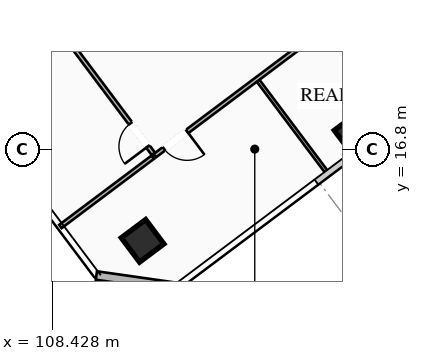
"""IFC4 building model, lengths in metres.
Left out: names, types, materials, properties, quantities, classifications, styles, units other than length and angle.
Written with IfcOpenShell. Run it as: python <this file> out.ifc"""

import sys

from ifc_helpers import new_model, si_unit, direction, frame, frame_2d, origin, origin_2d, place, context, subcontext, project, spatial, rectangle, hollow_rectangle, extrude, element, fill, save


model = new_model("IFC4")
c1 = context("Model", 3, precision=1e-05, world=origin(), true_north=direction((0.0, 1.0)))
c2 = subcontext(c1, "Body", "Model", "MODEL_VIEW")
j1 = project(units=[si_unit("LENGTHUNIT", "METRE"), si_unit("PLANEANGLEUNIT", "RADIAN")], contexts=[c1])
p1 = place(None, origin())
s1 = spatial("IfcSite", under=j1, at=p1, CompositionType="ELEMENT")
p2 = place(p1, origin())
s2 = spatial("IfcBuilding", under=s1, at=p2, CompositionType="ELEMENT")
p3 = place(p2, frame((0.0, 0.0, 239.7)))
s3 = spatial("IfcBuildingStorey", under=s2, at=p3, CompositionType="ELEMENT", Elevation=239.7)
p4 = place(p3, frame((111.4, 13.8, 0.0), z_axis=(0.0, 0.0, 1.0), x_axis=(0.799999996291, 0.600000004945, 0.0)))
e1 = element("IfcColumn", 1, at=p4, inside=s3, PredefinedType="COLUMN", context=c2, shape_type="SweptSolid", body=[
    extrude(hollow_rectangle(XDim=1.0, YDim=1.0, WallThickness=0.04, at=origin_2d()), origin(), (0.0, 0.0, 1.0), 3.37),
])
p5 = place(p3, frame((118.23, 17.36, 0.0), z_axis=(0.0, 0.0, 1.0), x_axis=(0.799999996291, 0.600000004945, 0.0)))
e2 = element("IfcColumn", 2, at=p5, inside=s3, PredefinedType="COLUMN", context=c2, shape_type="SweptSolid", body=[
    extrude(hollow_rectangle(XDim=0.75, YDim=0.75, WallThickness=0.032, at=origin_2d()), origin(), (0.0, 0.0, 1.0), 3.37),
])
p6 = place(p3, frame((112.54, 12.28, 0.0), z_axis=(0.0, 0.0, 1.0), x_axis=(-0.989956760759, 0.141370477216, 0.0)))
e3 = element("IfcWall", 3, at=p6, inside=s3, PredefinedType="SOLIDWALL", context=c2, shape_type="SweptSolid", body=[
    extrude(rectangle(XDim=2.687, YDim=0.28, at=frame_2d((1.344, 0.0))), origin(), (0.0, 0.0, 1.0), 3.37),
])
p7 = place(p3, frame((124.12, 25.84, 0.0), z_axis=(0.0, 0.0, 1.0), x_axis=(-0.800001902384, -0.599997463479, 0.0)))
e4 = element("IfcWall", 4, at=p7, inside=s3, PredefinedType="PARTITIONING", context=c2, shape_type="SweptSolid", body=[
    extrude(rectangle(XDim=15.4, YDim=0.135, at=frame_2d((7.7, 0.0))), origin(), (0.0, 0.0, 1.0), 2.723),
])
p8 = place(p7, frame((14.07, 0.0, 0.0)))
e5 = element("IfcOpeningElement", 5, at=p8, cuts=e4, PredefinedType="OPENING", context=c2, shape_type="SweptSolid", body=[
    extrude(rectangle(XDim=0.95, YDim=2.05, at=frame_2d((0.475, 1.025))), frame((0.0, 0.077, 0.0), z_axis=(0.0, -1.0, 0.0), x_axis=(1.0, 0.0, 0.0)), (0.0, 0.0, 1.0), 0.155),
])
p9 = place(p7, frame((3.64, 0.0, 0.0)))
e6 = element("IfcOpeningElement", 6, at=p9, cuts=e4, PredefinedType="OPENING", context=c2, shape_type="SweptSolid", body=[
    extrude(rectangle(XDim=0.95, YDim=2.05, at=frame_2d((0.475, 1.025))), frame((0.0, 0.077, 0.0), z_axis=(0.0, -1.0, 0.0), x_axis=(1.0, 0.0, 0.0)), (0.0, 0.0, 1.0), 0.155),
])
p10 = place(p7, frame((0.38, 0.0, 0.0)))
e7 = element("IfcOpeningElement", 7, at=p10, cuts=e4, PredefinedType="OPENING", context=c2, shape_type="SweptSolid", body=[
    extrude(rectangle(XDim=0.95, YDim=2.05, at=frame_2d((0.475, 1.025))), frame((0.0, 0.077, 0.0), z_axis=(0.0, -1.0, 0.0), x_axis=(1.0, 0.0, 0.0)), (0.0, 0.0, 1.0), 0.155),
])
p11 = place(p3, frame((117.488, 16.016, 0.0), z_axis=(0.0, 0.0, 1.0), x_axis=(-0.600030839559, 0.799976869402, 0.0)))
e8 = element("IfcWall", 8, at=p11, inside=s3, PredefinedType="PARTITIONING", context=c2, shape_type="SweptSolid", body=[
    extrude(rectangle(XDim=3.8, YDim=0.11, at=frame_2d((1.9, 0.0))), origin(), (0.0, 0.0, 1.0), 2.723),
])
p12 = place(p3, frame((111.752, 16.664, 0.0), z_axis=(0.0, 0.0, 1.0), x_axis=(-0.599998165212, 0.800001376088, 0.0)))
e9 = element("IfcWall", 9, at=p12, inside=s3, PredefinedType="PARTITIONING", context=c2, shape_type="SweptSolid", body=[
    extrude(rectangle(XDim=21.29, YDim=0.135, at=frame_2d((10.645, 0.0))), origin(), (0.0, 0.0, 1.0), 2.723),
])
p13 = place(p12, frame((0.3, 0.0, 0.0)))
e10 = element("IfcOpeningElement", 10, at=p13, cuts=e9, PredefinedType="OPENING", context=c2, shape_type="SweptSolid", body=[
    extrude(rectangle(XDim=0.95, YDim=2.05, at=frame_2d((0.475, 1.025))), frame((0.0, 0.077, 0.0), z_axis=(0.0, -1.0, 0.0), x_axis=(1.0, 0.0, 0.0)), (0.0, 0.0, 1.0), 0.155),
])
p14 = place(p3, frame((108.696, 14.272, 0.0), z_axis=(0.0, 0.0, 1.0), x_axis=(0.8, 0.6, 0.0)))
e11 = element("IfcWall", 11, at=p14, inside=s3, PredefinedType="PARTITIONING", context=c2, shape_type="SweptSolid", body=[
    extrude(rectangle(XDim=3.8, YDim=0.135, at=frame_2d((1.9, 0.0))), origin(), (0.0, 0.0, 1.0), 2.723),
])
p15 = place(p8, origin())
e12 = element("IfcDoor", 12, at=p15, inside=s3, OperationType="SINGLE_SWING_LEFT", PredefinedType="DOOR", context=c2, shape_type="SweptSolid", body=[
    extrude(rectangle(XDim=0.95, YDim=2.05, at=frame_2d((0.475, 1.025))), frame((0.0, 0.025, 0.0), z_axis=(0.0, -1.0, 0.0), x_axis=(1.0, 0.0, 0.0)), (0.0, 0.0, 1.0), 0.05),
])
fill(e5, e12)
p16 = place(p13, origin())
e13 = element("IfcDoor", 13, at=p16, inside=s3, OperationType="SINGLE_SWING_LEFT", PredefinedType="DOOR", context=c2, shape_type="SweptSolid", body=[
    extrude(rectangle(XDim=0.95, YDim=2.05, at=frame_2d((0.475, 1.025))), frame((0.0, 0.025, 0.0), z_axis=(0.0, -1.0, 0.0), x_axis=(1.0, 0.0, 0.0)), (0.0, 0.0, 1.0), 0.05),
])
fill(e10, e13)
save(model, sys.argv[1])
